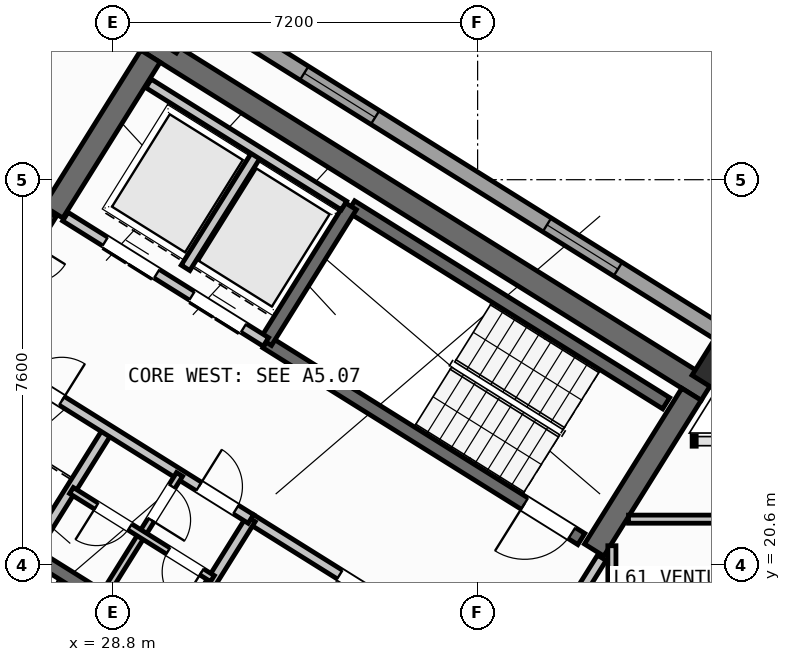
"""IFC4 building model, lengths in metres.
Left out: names, types, materials, properties, quantities, classifications, styles, units other than length and angle.
Written with IfcOpenShell. Run it as: python <this file> out.ifc"""

import sys

from ifc_helpers import new_model, si_unit, direction, frame, frame_2d, origin, origin_2d, place, context, subcontext, project, spatial, rectangle, hollow_rectangle, extrude, source, transform, mapped, element, fill, save


model = new_model("IFC4")
c1 = context("Model", 3, precision=1e-05, world=origin(), true_north=direction((0.0, 1.0)))
c2 = subcontext(c1, "Body", "Model", "MODEL_VIEW")
j1 = project(units=[si_unit("LENGTHUNIT", "METRE"), si_unit("PLANEANGLEUNIT", "RADIAN")], contexts=[c1])
p1 = place(None, origin())
s1 = spatial("IfcSite", under=j1, at=p1, CompositionType="ELEMENT")
p2 = place(p1, origin())
s2 = spatial("IfcBuilding", under=s1, at=p2, CompositionType="ELEMENT")
p3 = place(p2, frame((0.0, 0.0, 242.1)))
s3 = spatial("IfcBuildingStorey", under=s2, at=p3, CompositionType="ELEMENT", Elevation=242.1)
p4 = place(p3, frame((40.531, 24.036, 0.0), z_axis=(0.0, 0.0, 1.0), x_axis=(-0.848048787466, 0.529918157905, 0.0)))
e1 = element("IfcWall", 1, at=p4, inside=s3, PredefinedType="SHEAR", context=c2, shape_type="SweptSolid", body=[
    extrude(rectangle(XDim=13.04, YDim=0.45, at=frame_2d((6.52, 0.0))), origin(), (0.0, 0.0, 1.0), 3.32),
])
for number, where, z_axis, x_axis in (
    (2, (40.221, 23.965, 0.0), (0.0, 0.0, 1.0), (-0.53, -0.848, 0.0)),
    (3, (29.544, 30.636, 0.0), (0.0, 0.0, 1.0), (-0.53, -0.848, 0.0)),
):
    element("IfcWall", number, at=place(p3, frame(where, z_axis=z_axis, x_axis=x_axis)), inside=s3, PredefinedType="SHEAR", context=c2, shape_type="SweptSolid", body=[
        extrude(rectangle(XDim=3.625, YDim=0.45, at=frame_2d((1.812, 0.0))), origin(), (0.0, 0.0, 1.0), 3.32),
    ])
m1 = source(origin(), c2, "Body", "SweptSolid", [
    extrude(hollow_rectangle(XDim=0.8, YDim=0.8, WallThickness=0.032, at=origin_2d()), origin(), (0.0, 0.0, 1.0), 3.6),
])
for number, where, z_axis, x_axis in (
    (4, (40.783, 24.469, 0.0), (0.0, 0.0, 1.0), (-0.848, 0.53, 0.0)),
    (5, (29.928, 31.251, 0.0), (0.0, 0.0, 1.0), (-0.848, 0.53, 0.0)),
):
    element("IfcColumn", number, at=place(p3, frame(where, z_axis=z_axis, x_axis=x_axis)), inside=s3, PredefinedType="COLUMN", context=c2, shape_type="MappedRepresentation", body=[
        mapped(m1, transform((0.0, 0.0, 0.0), scale=1.0)),
    ])
p5 = place(p3, frame((29.268, 6.429, 0.0), z_axis=(0.0, 0.0, 1.0), x_axis=(-0.848049971435, 0.529916263149, 0.0)))
e6 = element("IfcWall", 6, at=p5, inside=s3, PredefinedType="STANDARD", context=c2, shape_type="SweptSolid", body=[
    extrude(rectangle(XDim=31.588, YDim=0.32, at=frame_2d((15.794, 0.0))), origin(), (0.0, 0.0, 1.0), 3.32),
])
p6 = place(p5, frame((16.235, 0.0, 0.0)))
e7 = element("IfcOpeningElement", 7, at=p6, cuts=e6, PredefinedType="OPENING", context=c2, shape_type="SweptSolid", body=[
    extrude(rectangle(XDim=1.2, YDim=2.15, at=frame_2d((0.6, 1.075))), frame((0.0, 0.17, 0.0), z_axis=(0.0, -1.0, 0.0), x_axis=(1.0, 0.0, 0.0)), (0.0, 0.0, 1.0), 0.34),
])
p7 = place(p5, frame((3.859, 0.0, 0.9)))
e8 = element("IfcOpeningElement", 8, at=p7, cuts=e6, PredefinedType="OPENING", context=c2, shape_type="SweptSolid", body=[
    extrude(rectangle(XDim=1.65, YDim=1.45, at=frame_2d((0.825, 0.725))), frame((0.0, 0.17, 0.0), z_axis=(0.0, -1.0, 0.0), x_axis=(1.0, 0.0, 0.0)), (0.0, 0.0, 1.0), 0.34),
])
p8 = place(p5, frame((10.519, 0.0, 0.9)))
e9 = element("IfcOpeningElement", 9, at=p8, cuts=e6, PredefinedType="OPENING", context=c2, shape_type="SweptSolid", body=[
    extrude(rectangle(XDim=1.65, YDim=1.45, at=frame_2d((0.825, 0.725))), frame((0.0, 0.17, 0.0), z_axis=(0.0, -1.0, 0.0), x_axis=(1.0, 0.0, 0.0)), (0.0, 0.0, 1.0), 0.34),
])
p9 = place(p5, frame((19.182, 0.0, 1.0)))
e10 = element("IfcOpeningElement", 10, at=p9, cuts=e6, PredefinedType="OPENING", context=c2, shape_type="SweptSolid", body=[
    extrude(rectangle(XDim=0.9, YDim=1.25, at=frame_2d((0.45, 0.625))), frame((0.0, 0.17, 0.0), z_axis=(0.0, -1.0, 0.0), x_axis=(1.0, 0.0, 0.0)), (0.0, 0.0, 1.0), 0.34),
])
p10 = place(p5, frame((22.524, 0.0, 1.0)))
e11 = element("IfcOpeningElement", 11, at=p10, cuts=e6, PredefinedType="OPENING", context=c2, shape_type="SweptSolid", body=[
    extrude(rectangle(XDim=0.9, YDim=1.25, at=frame_2d((0.45, 0.625))), frame((0.0, 0.17, 0.0), z_axis=(0.0, -1.0, 0.0), x_axis=(1.0, 0.0, 0.0)), (0.0, 0.0, 1.0), 0.34),
])
p11 = place(p5, frame((25.658, 0.0, 0.9)))
e12 = element("IfcOpeningElement", 12, at=p11, cuts=e6, PredefinedType="OPENING", context=c2, shape_type="SweptSolid", body=[
    extrude(rectangle(XDim=1.65, YDim=1.45, at=frame_2d((0.825, 0.725))), frame((0.0, 0.17, 0.0), z_axis=(0.0, -1.0, 0.0), x_axis=(1.0, 0.0, 0.0)), (0.0, 0.0, 1.0), 0.34),
])
p12 = place(p5, frame((29.278, 0.0, 0.9)))
e13 = element("IfcOpeningElement", 13, at=p12, cuts=e6, PredefinedType="OPENING", context=c2, shape_type="SweptSolid", body=[
    extrude(rectangle(XDim=1.35, YDim=1.45, at=frame_2d((0.675, 0.725))), frame((0.0, 0.17, 0.0), z_axis=(0.0, -1.0, 0.0), x_axis=(1.0, 0.0, 0.0)), (0.0, 0.0, 1.0), 0.34),
])
p13 = place(p3, frame((14.138, 41.825, 0.0), z_axis=(0.0, 0.0, 1.0), x_axis=(0.848046498049, -0.529921821731, 0.0)))
e14 = element("IfcWall", 14, at=p13, inside=s3, PredefinedType="STANDARD", context=c2, shape_type="SweptSolid", body=[
    extrude(rectangle(XDim=31.588, YDim=0.32, at=frame_2d((15.794, 0.0))), origin(), (0.0, 0.0, 1.0), 3.32),
])
p14 = place(p13, frame((9.712, 0.0, 0.0)))
e15 = element("IfcOpeningElement", 15, at=p14, cuts=e14, PredefinedType="OPENING", context=c2, shape_type="SweptSolid", body=[
    extrude(rectangle(XDim=1.05, YDim=2.15, at=frame_2d((0.525, 1.075))), frame((0.0, 0.17, 0.0), z_axis=(0.0, -1.0, 0.0), x_axis=(1.0, 0.0, 0.0)), (0.0, 0.0, 1.0), 0.34),
])
p15 = place(p13, frame((0.841, 0.0, 0.9)))
e16 = element("IfcOpeningElement", 16, at=p15, cuts=e14, PredefinedType="OPENING", context=c2, shape_type="SweptSolid", body=[
    extrude(rectangle(XDim=1.65, YDim=1.45, at=frame_2d((0.825, 0.725))), frame((0.0, 0.17, 0.0), z_axis=(0.0, -1.0, 0.0), x_axis=(1.0, 0.0, 0.0)), (0.0, 0.0, 1.0), 0.34),
])
p16 = place(p13, frame((4.171, 0.0, 1.0)))
e17 = element("IfcOpeningElement", 17, at=p16, cuts=e14, PredefinedType="OPENING", context=c2, shape_type="SweptSolid", body=[
    extrude(rectangle(XDim=0.9, YDim=1.25, at=frame_2d((0.45, 0.625))), frame((0.0, 0.17, 0.0), z_axis=(0.0, -1.0, 0.0), x_axis=(1.0, 0.0, 0.0)), (0.0, 0.0, 1.0), 0.34),
])
p17 = place(p13, frame((13.624, 0.0, 0.95)))
e18 = element("IfcOpeningElement", 18, at=p17, cuts=e14, PredefinedType="OPENING", context=c2, shape_type="SweptSolid", body=[
    extrude(rectangle(XDim=1.95, YDim=1.35, at=frame_2d((0.975, 0.675))), frame((0.0, 0.17, 0.0), z_axis=(0.0, -1.0, 0.0), x_axis=(1.0, 0.0, 0.0)), (0.0, 0.0, 1.0), 0.34),
])
p18 = place(p13, frame((17.129, 0.0, 1.0)))
e19 = element("IfcOpeningElement", 19, at=p18, cuts=e14, PredefinedType="OPENING", context=c2, shape_type="SweptSolid", body=[
    extrude(rectangle(XDim=0.9, YDim=1.25, at=frame_2d((0.45, 0.625))), frame((0.0, 0.17, 0.0), z_axis=(0.0, -1.0, 0.0), x_axis=(1.0, 0.0, 0.0)), (0.0, 0.0, 1.0), 0.34),
])
p19 = place(p13, frame((21.744, 0.0, 0.9)))
e20 = element("IfcOpeningElement", 20, at=p19, cuts=e14, PredefinedType="OPENING", context=c2, shape_type="SweptSolid", body=[
    extrude(rectangle(XDim=1.65, YDim=1.45, at=frame_2d((0.825, 0.725))), frame((0.0, 0.17, 0.0), z_axis=(0.0, -1.0, 0.0), x_axis=(1.0, 0.0, 0.0)), (0.0, 0.0, 1.0), 0.34),
])
p20 = place(p13, frame((27.394, 0.0, 0.9)))
e21 = element("IfcOpeningElement", 21, at=p20, cuts=e14, PredefinedType="OPENING", context=c2, shape_type="SweptSolid", body=[
    extrude(rectangle(XDim=1.65, YDim=1.45, at=frame_2d((0.825, 0.725))), frame((0.0, 0.17, 0.0), z_axis=(0.0, -1.0, 0.0), x_axis=(1.0, 0.0, 0.0)), (0.0, 0.0, 1.0), 0.34),
])
p21 = place(p3, frame((31.28, 18.261, 0.0), z_axis=(0.0, 0.0, 1.0), x_axis=(-0.848051618787, 0.529913626805, 0.0)))
e22 = element("IfcWall", 22, at=p21, inside=s3, PredefinedType="SHEAR", context=c2, shape_type="SweptSolid", body=[
    extrude(rectangle(XDim=7.46, YDim=0.26, at=frame_2d((3.73, 0.0))), origin(), (0.0, 0.0, 1.0), 3.32),
])
p22 = place(p21, frame((0.36, 0.0, 0.0)))
e23 = element("IfcOpeningElement", 23, at=p22, cuts=e22, PredefinedType="OPENING", context=c2, shape_type="SweptSolid", body=[
    extrude(rectangle(XDim=0.86, YDim=2.05, at=frame_2d((0.43, 1.025))), frame((0.0, 0.14, 0.0), z_axis=(0.0, -1.0, 0.0), x_axis=(1.0, 0.0, 0.0)), (0.0, 0.0, 1.0), 0.28),
])
p23 = place(p3, frame((39.721, 23.788, 0.0), z_axis=(0.0, 0.0, 1.0), x_axis=(-0.848054434086, 0.529909121291, 0.0)))
e24 = element("IfcWall", 24, at=p23, inside=s3, PredefinedType="SHEAR", context=c2, shape_type="SweptSolid", body=[
    extrude(rectangle(XDim=7.33, YDim=0.26, at=frame_2d((3.665, 0.0))), origin(), (0.0, 0.0, 1.0), 3.32),
])
p24 = place(p3, frame((38.046, 21.108, 0.0), z_axis=(0.0, 0.0, 1.0), x_axis=(-0.848054434086, 0.529909121291, 0.0)))
e25 = element("IfcWall", 25, at=p24, inside=s3, PredefinedType="SHEAR", context=c2, shape_type="SweptSolid", body=[
    extrude(rectangle(XDim=7.33, YDim=0.26, at=frame_2d((3.665, 0.0))), origin(), (0.0, 0.0, 1.0), 3.32),
])
p25 = place(p24, frame((0.22, 0.0, 0.0)))
e26 = element("IfcOpeningElement", 26, at=p25, cuts=e25, PredefinedType="OPENING", context=c2, shape_type="SweptSolid", body=[
    extrude(rectangle(XDim=1.1, YDim=2.1, at=frame_2d((0.55, 1.05))), frame((0.0, 0.14, 0.0), z_axis=(0.0, -1.0, 0.0), x_axis=(1.0, 0.0, 0.0)), (0.0, 0.0, 1.0), 0.28),
])
p26 = place(p3, frame((33.496, 27.677, 0.0), z_axis=(0.0, 0.0, 1.0), x_axis=(-0.529908658664, -0.84805472316, 0.0)))
e27 = element("IfcWall", 27, at=p26, inside=s3, PredefinedType="SHEAR", context=c2, shape_type="SweptSolid", body=[
    extrude(rectangle(XDim=3.16, YDim=0.26, at=frame_2d((1.58, 0.0))), origin(), (0.0, 0.0, 1.0), 3.32),
])
p27 = place(p3, frame((36.459, 18.421, 0.0), z_axis=(0.0, 0.0, 1.0), x_axis=(-0.848059591691, 0.529900867089, 0.0)))
e28 = element("IfcWall", 28, at=p27, inside=s3, PredefinedType="STANDARD", context=c2, shape_type="SweptSolid", body=[
    extrude(rectangle(XDim=5.818, YDim=0.2, at=frame_2d((2.909, 0.0))), origin(), (0.0, 0.0, 1.0), 3.31),
])
p28 = place(p27, frame((2.598, 0.0, 0.0)))
e29 = element("IfcOpeningElement", 29, at=p28, cuts=e28, PredefinedType="OPENING", context=c2, shape_type="SweptSolid", body=[
    extrude(rectangle(XDim=1.15, YDim=2.1, at=frame_2d((0.575, 1.05))), frame((0.0, 0.11, 0.0), z_axis=(0.0, -1.0, 0.0), x_axis=(1.0, 0.0, 0.0)), (0.0, 0.0, 1.0), 0.22),
])
p29 = place(p3, frame((31.822, 24.998, 0.0), z_axis=(0.0, 0.0, 1.0), x_axis=(-0.848054125777, 0.529909614701, 0.0)))
e30 = element("IfcWall", 30, at=p29, inside=s3, PredefinedType="STANDARD", context=c2, shape_type="SweptSolid", body=[
    extrude(rectangle(XDim=4.668, YDim=0.2, at=frame_2d((2.334, 0.0))), origin(), (0.0, 0.0, 1.0), 3.31),
])
p30 = place(p29, frame((0.52, 0.0, 0.0)))
e31 = element("IfcOpeningElement", 31, at=p30, cuts=e30, PredefinedType="OPENING", context=c2, shape_type="SweptSolid", body=[
    extrude(rectangle(XDim=1.2, YDim=2.15, at=frame_2d((0.6, 1.075))), frame((0.0, 0.11, 0.0), z_axis=(0.0, -1.0, 0.0), x_axis=(1.0, 0.0, 0.0)), (0.0, 0.0, 1.0), 0.22),
])
p31 = place(p29, frame((2.54, 0.0, 0.0)))
e32 = element("IfcOpeningElement", 32, at=p31, cuts=e30, PredefinedType="OPENING", context=c2, shape_type="SweptSolid", body=[
    extrude(rectangle(XDim=1.2, YDim=2.15, at=frame_2d((0.6, 1.075))), frame((0.0, 0.11, 0.0), z_axis=(0.0, -1.0, 0.0), x_axis=(1.0, 0.0, 0.0)), (0.0, 0.0, 1.0), 0.22),
])
p32 = place(p3, frame((31.645, 28.716, 0.0), z_axis=(0.0, 0.0, 1.0), x_axis=(-0.52986693015, -0.848080795876, 0.0)))
e33 = element("IfcWall", 33, at=p32, inside=s3, PredefinedType="STANDARD", context=c2, shape_type="SweptSolid", body=[
    extrude(rectangle(XDim=2.66, YDim=0.2, at=frame_2d((1.33, 0.0))), origin(), (0.0, 0.0, 1.0), 3.31),
])
p33 = place(p3, frame((33.363, 27.69, 0.0), z_axis=(0.0, 0.0, 1.0), x_axis=(-0.84804957148, 0.529916903215, 0.0)))
e34 = element("IfcWall", 34, at=p33, inside=s3, PredefinedType="STANDARD", context=c2, shape_type="SweptSolid", body=[
    extrude(rectangle(XDim=4.548, YDim=0.2, at=frame_2d((2.274, 0.0))), origin(), (0.0, 0.0, 1.0), 3.31),
])
for number, where, z_axis, x_axis in (
    (35, (31.525, 21.504, 0.0), (0.0, 0.0, 1.0), (-0.53, -0.848, 0.0)),
    (36, (28.71, 23.263, 0.0), (0.0, 0.0, 1.0), (-0.53, -0.848, 0.0)),
):
    element("IfcWall", number, at=place(p3, frame(where, z_axis=z_axis, x_axis=x_axis)), inside=s3, PredefinedType="STANDARD", context=c2, shape_type="SweptSolid", body=[
        extrude(rectangle(XDim=2.88, YDim=0.2, at=frame_2d((1.44, 0.0))), origin(), (0.0, 0.0, 1.0), 3.31),
    ])
p34 = place(p3, frame((31.525, 21.504, 0.0), z_axis=(0.0, 0.0, 1.0), x_axis=(-0.848042066329, 0.529928913853, 0.0)))
e37 = element("IfcWall", 37, at=p34, inside=s3, PredefinedType="STANDARD", context=c2, shape_type="SweptSolid", body=[
    extrude(rectangle(XDim=6.268, YDim=0.2, at=frame_2d((3.134, 0.0))), origin(), (0.0, 0.0, 1.0), 3.31),
])
p35 = place(p34, frame((4.4, 0.0, 0.0)))
e38 = element("IfcOpeningElement", 38, at=p35, cuts=e37, PredefinedType="OPENING", context=c2, shape_type="SweptSolid", body=[
    extrude(rectangle(XDim=0.86, YDim=2.05, at=frame_2d((0.43, 1.025))), frame((0.0, 0.11, 0.0), z_axis=(0.0, -1.0, 0.0), x_axis=(1.0, 0.0, 0.0)), (0.0, 0.0, 1.0), 0.22),
])
p36 = place(p34, frame((0.35, 0.0, 0.0)))
e39 = element("IfcOpeningElement", 39, at=p36, cuts=e37, PredefinedType="OPENING", context=c2, shape_type="SweptSolid", body=[
    extrude(rectangle(XDim=0.86, YDim=2.05, at=frame_2d((0.43, 1.025))), frame((0.0, 0.11, 0.0), z_axis=(0.0, -1.0, 0.0), x_axis=(1.0, 0.0, 0.0)), (0.0, 0.0, 1.0), 0.22),
])
p37 = place(p3, frame((30.117, 22.384, 0.0), z_axis=(0.0, 0.0, 1.0), x_axis=(-0.529951914384, -0.848027693204, 0.0)))
e40 = element("IfcWall", 40, at=p37, inside=s3, PredefinedType="PLUMBINGWALL", context=c2, shape_type="SweptSolid", body=[
    extrude(rectangle(XDim=1.4, YDim=0.14, at=frame_2d((0.7, 0.0))), origin(), (0.0, 0.0, 1.0), 3.31),
])
p38 = place(p37, frame((0.28, 0.0, 0.0)))
e41 = element("IfcOpeningElement", 41, at=p38, cuts=e40, PredefinedType="OPENING", context=c2, shape_type="SweptSolid", body=[
    extrude(rectangle(XDim=0.78, YDim=2.05, at=frame_2d((0.39, 1.025))), frame((0.0, 0.08, 0.0), z_axis=(0.0, -1.0, 0.0), x_axis=(1.0, 0.0, 0.0)), (0.0, 0.0, 1.0), 0.16),
])
p39 = place(p3, frame((29.375, 21.196, 0.0), z_axis=(0.0, 0.0, 1.0), x_axis=(-0.529865479138, -0.848081702443, 0.0)))
e42 = element("IfcWall", 42, at=p39, inside=s3, PredefinedType="PLUMBINGWALL", context=c2, shape_type="SweptSolid", body=[
    extrude(rectangle(XDim=1.48, YDim=0.14, at=frame_2d((0.74, 0.0))), origin(), (0.0, 0.0, 1.0), 3.31),
])
p40 = place(p3, frame((30.766, 20.327, 0.0), z_axis=(0.0, 0.0, 1.0), x_axis=(-0.848052663127, 0.529911955482, 0.0)))
e43 = element("IfcWall", 43, at=p40, inside=s3, PredefinedType="PLUMBINGWALL", context=c2, shape_type="SweptSolid", body=[
    extrude(rectangle(XDim=3.28, YDim=0.14, at=frame_2d((1.64, 0.0))), origin(), (0.0, 0.0, 1.0), 3.31),
])
p41 = place(p40, frame((0.25, 0.0, 0.0)))
e44 = element("IfcOpeningElement", 44, at=p41, cuts=e43, PredefinedType="OPENING", context=c2, shape_type="SweptSolid", body=[
    extrude(rectangle(XDim=0.78, YDim=2.05, at=frame_2d((0.39, 1.025))), frame((0.0, 0.08, 0.0), z_axis=(0.0, -1.0, 0.0), x_axis=(1.0, 0.0, 0.0)), (0.0, 0.0, 1.0), 0.16),
])
p42 = place(p40, frame((1.92, 0.0, 0.0)))
e45 = element("IfcOpeningElement", 45, at=p42, cuts=e43, PredefinedType="OPENING", context=c2, shape_type="SweptSolid", body=[
    extrude(rectangle(XDim=0.78, YDim=2.05, at=frame_2d((0.39, 1.025))), frame((0.0, 0.08, 0.0), z_axis=(0.0, -1.0, 0.0), x_axis=(1.0, 0.0, 0.0)), (0.0, 0.0, 1.0), 0.16),
])
p43 = place(p3, frame((27.596, 27.52, 0.0), z_axis=(0.0, 0.0, 1.0), x_axis=(-0.529865479138, -0.848081702443, 0.0)))
e46 = element("IfcWall", 46, at=p43, inside=s3, PredefinedType="STANDARD", context=c2, shape_type="SweptSolid", body=[
    extrude(rectangle(XDim=2.96, YDim=0.2, at=frame_2d((1.48, 0.0))), origin(), (0.0, 0.0, 1.0), 3.31),
])
p44 = place(p43, frame((0.7, 0.0, 0.0)))
e47 = element("IfcOpeningElement", 47, at=p44, cuts=e46, PredefinedType="OPENING", context=c2, shape_type="SweptSolid", body=[
    extrude(rectangle(XDim=1.5, YDim=2.15, at=frame_2d((0.75, 1.075))), frame((0.0, 0.11, 0.0), z_axis=(0.0, -1.0, 0.0), x_axis=(1.0, 0.0, 0.0)), (0.0, 0.0, 1.0), 0.22),
])
p45 = place(p3, frame((27.57, 27.478, 0.0), z_axis=(0.0, 0.0, 1.0), x_axis=(-0.848050851465, 0.529914854792, 0.0)))
e48 = element("IfcWall", 48, at=p45, inside=s3, PredefinedType="PARTITIONING", context=c2, shape_type="SweptSolid", body=[
    extrude(rectangle(XDim=2.61, YDim=0.16, at=frame_2d((1.305, 0.0))), origin(), (0.0, 0.0, 1.0), 3.31),
])
p46 = place(p45, frame((0.95, 0.0, 0.0)))
e49 = element("IfcOpeningElement", 49, at=p46, cuts=e48, PredefinedType="OPENING", context=c2, shape_type="SweptSolid", body=[
    extrude(rectangle(XDim=0.86, YDim=2.05, at=frame_2d((0.43, 1.025))), frame((0.0, 0.09, 0.0), z_axis=(0.0, -1.0, 0.0), x_axis=(1.0, 0.0, 0.0)), (0.0, 0.0, 1.0), 0.18),
])
p47 = place(p3, frame((27.953, 33.016, 0.0), z_axis=(0.0, 0.0, 1.0), x_axis=(-0.529903001606, -0.848058257957, 0.0)))
e50 = element("IfcWall", 50, at=p47, inside=s3, PredefinedType="PARTITIONING", context=c2, shape_type="SweptSolid", body=[
    extrude(rectangle(XDim=9.15, YDim=0.16, at=frame_2d((4.575, 0.0))), origin(), (0.0, 0.0, 1.0), 3.31),
])
p48 = place(p3, frame((38.451, 20.737, 0.0), z_axis=(0.0, 0.0, 1.0), x_axis=(-0.529924799939, -0.848044637038, 0.0)))
e51 = element("IfcWall", 51, at=p48, inside=s3, PredefinedType="STANDARD", context=c2, shape_type="SweptSolid", body=[
    extrude(rectangle(XDim=2.96, YDim=0.2, at=frame_2d((1.48, 0.0))), origin(), (0.0, 0.0, 1.0), 3.31),
])
p49 = place(p48, frame((1.46, 0.0, 0.0)))
e52 = element("IfcOpeningElement", 52, at=p49, cuts=e51, PredefinedType="OPENING", context=c2, shape_type="SweptSolid", body=[
    extrude(rectangle(XDim=0.86, YDim=2.05, at=frame_2d((0.43, 1.025))), frame((0.0, 0.11, 0.0), z_axis=(0.0, -1.0, 0.0), x_axis=(1.0, 0.0, 0.0)), (0.0, 0.0, 1.0), 0.22),
])
p50 = place(p3, frame((38.65, 17.93, 0.0), z_axis=(0.0, 0.0, 1.0), x_axis=(0.0, 1.0, 0.0)))
e53 = element("IfcWall", 53, at=p50, inside=s3, PredefinedType="PARTITIONING", context=c2, shape_type="SweptSolid", body=[
    extrude(rectangle(XDim=3.046, YDim=0.16, at=frame_2d((1.523, 0.0))), origin(), (0.0, 0.0, 1.0), 3.31),
])
p51 = place(p3, frame((38.978, 21.5, 0.0), z_axis=(0.0, 0.0, 1.0), x_axis=(1.0, 0.0, 0.0)))
e54 = element("IfcWall", 54, at=p51, inside=s3, PredefinedType="PARTITIONING", context=c2, shape_type="SweptSolid", body=[
    extrude(rectangle(XDim=7.336, YDim=0.16, at=frame_2d((3.668, 0.0))), origin(), (0.0, 0.0, 1.0), 3.31),
])
m2 = source(origin(), c2, "Body", "SweptSolid", [
    extrude(rectangle(XDim=1.65, YDim=1.45, at=frame_2d((0.825, 0.725))), frame((0.0, 0.03, 0.0), z_axis=(0.0, -1.0, 0.0), x_axis=(1.0, 0.0, 0.0)), (0.0, 0.0, 1.0), 0.06),
])
p52 = place(p19, origin())
e55 = element("IfcWindow", 55, at=p52, inside=s3, PartitioningType="SINGLE_PANEL", PredefinedType="WINDOW", context=c2, shape_type="MappedRepresentation", body=[
    mapped(m2, transform((0.0, 0.0, 0.0), scale=1.0)),
])
fill(e20, e55)
p53 = place(p20, origin())
e56 = element("IfcWindow", 56, at=p53, inside=s3, PartitioningType="SINGLE_PANEL", PredefinedType="WINDOW", context=c2, shape_type="MappedRepresentation", body=[
    mapped(m2, transform((0.0, 0.0, 0.0), scale=1.0)),
])
fill(e21, e56)
m3 = source(origin(), c2, "Body", "SweptSolid", [
    extrude(rectangle(XDim=1.1, YDim=2.1, at=frame_2d((0.55, 1.05))), frame((0.0, 0.025, 0.0), z_axis=(0.0, -1.0, 0.0), x_axis=(1.0, 0.0, 0.0)), (0.0, 0.0, 1.0), 0.05),
])
p54 = place(p25, origin())
e57 = element("IfcDoor", 57, at=p54, inside=s3, OperationType="SINGLE_SWING_RIGHT", PredefinedType="DOOR", context=c2, shape_type="MappedRepresentation", body=[
    mapped(m3, transform((0.0, 0.0, 0.0), scale=1.0)),
])
fill(e26, e57)
m4 = source(origin(), c2, "Body", "SweptSolid", [
    extrude(rectangle(XDim=1.15, YDim=2.1, at=frame_2d((0.575, 1.05))), frame((0.0, 0.025, 0.0), z_axis=(0.0, -1.0, 0.0), x_axis=(1.0, 0.0, 0.0)), (0.0, 0.0, 1.0), 0.05),
])
p55 = place(p28, origin())
e58 = element("IfcDoor", 58, at=p55, inside=s3, OperationType="SINGLE_SWING_LEFT", PredefinedType="DOOR", context=c2, shape_type="MappedRepresentation", body=[
    mapped(m4, transform((0.0, 0.0, 0.0), scale=1.0)),
])
fill(e29, e58)
m5 = source(origin(), c2, "Body", "SweptSolid", [
    extrude(rectangle(XDim=1.2, YDim=2.15, at=frame_2d((0.6, 1.075))), frame((0.0, 0.025, 0.0), z_axis=(0.0, -1.0, 0.0), x_axis=(1.0, 0.0, 0.0)), (0.0, 0.0, 1.0), 0.05),
])
p56 = place(p30, origin())
e59 = element("IfcDoor", 59, at=p56, inside=s3, OperationType="DOUBLE_DOOR_SLIDING", PredefinedType="DOOR", context=c2, shape_type="MappedRepresentation", body=[
    mapped(m5, transform((0.0, 0.0, 0.0), scale=1.0)),
])
fill(e31, e59)
p57 = place(p31, origin())
e60 = element("IfcDoor", 60, at=p57, inside=s3, OperationType="DOUBLE_DOOR_SLIDING", PredefinedType="DOOR", context=c2, shape_type="MappedRepresentation", body=[
    mapped(m5, transform((0.0, 0.0, 0.0), scale=1.0)),
])
fill(e32, e60)
m6 = source(origin(), c2, "Body", "SweptSolid", [
    extrude(rectangle(XDim=0.86, YDim=2.05, at=frame_2d((0.43, 1.025))), frame((0.0, 0.025, 0.0), z_axis=(0.0, -1.0, 0.0), x_axis=(1.0, 0.0, 0.0)), (0.0, 0.0, 1.0), 0.05),
])
p58 = place(p35, frame((0.86, 0.0, 0.0), z_axis=(0.0, 0.0, 1.0), x_axis=(-1.0, 0.0, 0.0)))
e61 = element("IfcDoor", 61, at=p58, inside=s3, OperationType="SINGLE_SWING_RIGHT", PredefinedType="DOOR", context=c2, shape_type="MappedRepresentation", body=[
    mapped(m6, transform((0.0, 0.0, 0.0), scale=1.0)),
])
fill(e38, e61)
p59 = place(p36, frame((0.86, 0.0, 0.0), z_axis=(0.0, 0.0, 1.0), x_axis=(-1.0, 0.0, 0.0)))
e62 = element("IfcDoor", 62, at=p59, inside=s3, OperationType="SINGLE_SWING_LEFT", PredefinedType="DOOR", context=c2, shape_type="MappedRepresentation", body=[
    mapped(m6, transform((0.0, 0.0, 0.0), scale=1.0)),
])
fill(e39, e62)
m7 = source(origin(), c2, "Body", "SweptSolid", [
    extrude(rectangle(XDim=0.78, YDim=2.05, at=frame_2d((0.39, 1.025))), frame((0.0, 0.025, 0.0), z_axis=(0.0, -1.0, 0.0), x_axis=(1.0, 0.0, 0.0)), (0.0, 0.0, 1.0), 0.05),
])
p60 = place(p38, origin())
e63 = element("IfcDoor", 63, at=p60, inside=s3, OperationType="SINGLE_SWING_RIGHT", PredefinedType="DOOR", context=c2, shape_type="MappedRepresentation", body=[
    mapped(m7, transform((0.0, 0.0, 0.0), scale=1.0)),
])
fill(e41, e63)
p61 = place(p41, origin())
e64 = element("IfcDoor", 64, at=p61, inside=s3, OperationType="SINGLE_SWING_LEFT", PredefinedType="DOOR", context=c2, shape_type="MappedRepresentation", body=[
    mapped(m7, transform((0.0, 0.0, 0.0), scale=1.0)),
])
fill(e44, e64)
p62 = place(p42, origin())
e65 = element("IfcDoor", 65, at=p62, inside=s3, OperationType="SINGLE_SWING_RIGHT", PredefinedType="DOOR", context=c2, shape_type="MappedRepresentation", body=[
    mapped(m7, transform((0.0, 0.0, 0.0), scale=1.0)),
])
fill(e45, e65)
save(model, sys.argv[1])
